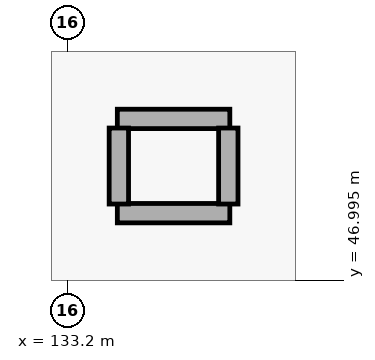
"""IFC4 building model, lengths in metres.
Left out: names, types, materials, properties, quantities, classifications, styles, units other than length and angle.
Written with IfcOpenShell. Run it as: python <this file> out.ifc"""

import sys

from ifc_helpers import new_model, si_unit, direction, frame, frame_2d, origin, place, context, subcontext, project, spatial, rectangle, extrude, element, save


model = new_model("IFC4")
c1 = context("Model", 3, precision=1e-05, world=origin(), true_north=direction((0.0, 1.0)))
c2 = subcontext(c1, "Body", "Model", "MODEL_VIEW")
j1 = project(units=[si_unit("LENGTHUNIT", "METRE"), si_unit("PLANEANGLEUNIT", "RADIAN")], contexts=[c1])
p1 = place(None, origin())
s1 = spatial("IfcSite", under=j1, at=p1, CompositionType="ELEMENT")
p2 = place(p1, origin())
s2 = spatial("IfcBuilding", under=s1, at=p2, CompositionType="ELEMENT")
p3 = place(p2, frame((0.0, 0.0, 10.5)))
s3 = spatial("IfcBuildingStorey", under=s2, at=p3, CompositionType="ELEMENT", Elevation=10.5)
for number, where, z_axis, x_axis in (
    (1, (133.86, 49.12, 0.0), (0.0, 0.0, 1.0), (1.0, 0.0, 0.0)),
    (2, (133.86, 47.88, 0.0), (0.0, 0.0, 1.0), (1.0, 0.0, 0.0)),
):
    element("IfcWall", number, at=place(p3, frame(where, z_axis=z_axis, x_axis=x_axis)), inside=s3, PredefinedType="PARTITIONING", context=c2, shape_type="SweptSolid", body=[
        extrude(rectangle(XDim=1.48, YDim=0.255, at=frame_2d((0.74, 0.0))), origin(), (0.0, 0.0, 1.0), 4.72),
    ])
for number, where, z_axis, x_axis in (
    (3, (133.88, 48.0, 0.0), (0.0, 0.0, 1.0), (0.0, 1.0, 0.0)),
    (4, (135.32, 48.0, 0.0), (0.0, 0.0, 1.0), (0.0, 1.0, 0.0)),
):
    element("IfcWall", number, at=place(p3, frame(where, z_axis=z_axis, x_axis=x_axis)), inside=s3, PredefinedType="PARTITIONING", context=c2, shape_type="SweptSolid", body=[
        extrude(rectangle(XDim=1.0, YDim=0.255, at=frame_2d((0.5, 0.0))), origin(), (0.0, 0.0, 1.0), 4.72),
    ])
save(model, sys.argv[1])
